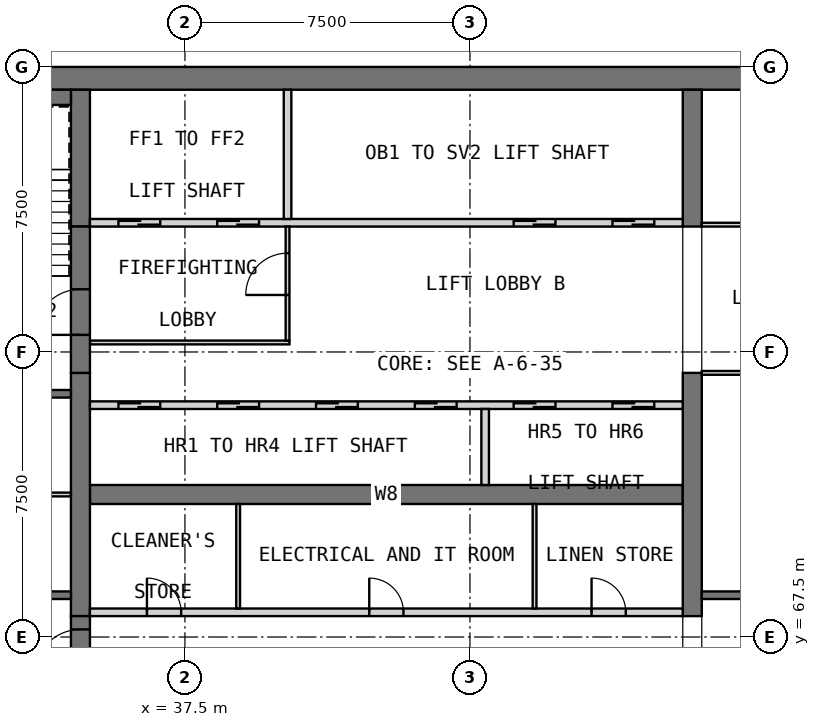
"""IFC4 building model, lengths in metres.
Left out: names, types, materials, properties, quantities, classifications, styles, units other than length and angle.
Written with IfcOpenShell. Run it as: python <this file> out.ifc"""

import sys

from ifc_helpers import new_model, si_unit, direction, frame, frame_2d, origin, place, context, subcontext, project, spatial, rectangle, extrude, element, fill, save


model = new_model("IFC4")
c1 = context("Model", 3, precision=1e-05, world=origin(), true_north=direction((0.0, 1.0)))
c2 = subcontext(c1, "Body", "Model", "MODEL_VIEW")
j1 = project(units=[si_unit("LENGTHUNIT", "METRE"), si_unit("PLANEANGLEUNIT", "RADIAN")], contexts=[c1])
p1 = place(None, origin())
s1 = spatial("IfcSite", under=j1, at=p1, CompositionType="ELEMENT")
p2 = place(p1, origin())
s2 = spatial("IfcBuilding", under=s1, at=p2, CompositionType="ELEMENT")
p3 = place(p2, frame((0.0, 0.0, 280.2)))
s3 = spatial("IfcBuildingStorey", under=s2, at=p3, CompositionType="ELEMENT", Elevation=280.2)
p4 = place(p3, frame((30.0, 82.2, 0.0), z_axis=(0.0, 0.0, 1.0), x_axis=(1.0, 0.0, 0.0)))
e1 = element("IfcWall", 1, at=p4, inside=s3, PredefinedType="SHEAR", context=c2, shape_type="SweptSolid", body=[
    extrude(rectangle(XDim=30.0, YDim=0.6, at=frame_2d((15.0, 0.0))), origin(), (0.0, 0.0, 1.0), 3.5),
])
p5 = place(p3, frame((35.0, 71.25, 0.0), z_axis=(0.0, 0.0, 1.0), x_axis=(1.0, 0.0, 0.0)))
e2 = element("IfcWall", 2, at=p5, inside=s3, PredefinedType="SHEAR", context=c2, shape_type="SweptSolid", body=[
    extrude(rectangle(XDim=15.6, YDim=0.5, at=frame_2d((7.8, 0.0))), origin(), (0.0, 0.0, 1.0), 3.5),
])
p6 = place(p3, frame((34.75, 68.05, 0.0), z_axis=(0.0, 0.0, 1.0), x_axis=(0.0, 1.0, 0.0)))
e3 = element("IfcWall", 3, at=p6, inside=s3, PredefinedType="SHEAR", context=c2, shape_type="SweptSolid", body=[
    extrude(rectangle(XDim=6.4, YDim=0.5, at=frame_2d((3.2, 0.0))), origin(), (0.0, 0.0, 1.0), 3.5),
])
p7 = place(p3, frame((34.75, 78.3, 0.0), z_axis=(0.0, 0.0, 1.0), x_axis=(0.0, 1.0, 0.0)))
e4 = element("IfcWall", 4, at=p7, inside=s3, PredefinedType="SHEAR", context=c2, shape_type="SweptSolid", body=[
    extrude(rectangle(XDim=3.6, YDim=0.5, at=frame_2d((1.8, 0.0))), origin(), (0.0, 0.0, 1.0), 3.5),
])
p8 = place(p3, frame((50.85, 68.05, 0.0), z_axis=(0.0, 0.0, 1.0), x_axis=(0.0, 1.0, 0.0)))
e5 = element("IfcWall", 5, at=p8, inside=s3, PredefinedType="SHEAR", context=c2, shape_type="SweptSolid", body=[
    extrude(rectangle(XDim=6.4, YDim=0.5, at=frame_2d((3.2, 0.0))), origin(), (0.0, 0.0, 1.0), 3.5),
])
p9 = place(p3, frame((50.85, 78.3, 0.0), z_axis=(0.0, 0.0, 1.0), x_axis=(0.0, 1.0, 0.0)))
e6 = element("IfcWall", 6, at=p9, inside=s3, PredefinedType="SHEAR", context=c2, shape_type="SweptSolid", body=[
    extrude(rectangle(XDim=3.6, YDim=0.5, at=frame_2d((1.8, 0.0))), origin(), (0.0, 0.0, 1.0), 3.5),
])
p10 = place(p3, frame((35.0, 68.15, 0.0), z_axis=(0.0, 0.0, 1.0), x_axis=(1.0, 0.0, 0.0)))
e7 = element("IfcWall", 7, at=p10, inside=s3, PredefinedType="PARTITIONING", context=c2, shape_type="SweptSolid", body=[
    extrude(rectangle(XDim=15.6, YDim=0.2, at=frame_2d((7.8, 0.0))), origin(), (0.0, 0.0, 1.0), 3.25),
])
p11 = place(p10, frame((1.5, 0.0, 0.0)))
e8 = element("IfcOpeningElement", 8, at=p11, cuts=e7, PredefinedType="OPENING", context=c2, shape_type="SweptSolid", body=[
    extrude(rectangle(XDim=0.9, YDim=2.1, at=frame_2d((0.45, 1.05))), frame((0.0, 0.11, 0.0), z_axis=(0.0, -1.0, 0.0), x_axis=(1.0, 0.0, 0.0)), (0.0, 0.0, 1.0), 0.22),
])
p12 = place(p10, frame((7.35, 0.0, 0.0)))
e9 = element("IfcOpeningElement", 9, at=p12, cuts=e7, PredefinedType="OPENING", context=c2, shape_type="SweptSolid", body=[
    extrude(rectangle(XDim=0.9, YDim=2.1, at=frame_2d((0.45, 1.05))), frame((0.0, 0.11, 0.0), z_axis=(0.0, -1.0, 0.0), x_axis=(1.0, 0.0, 0.0)), (0.0, 0.0, 1.0), 0.22),
])
p13 = place(p10, frame((13.2, 0.0, 0.0)))
e10 = element("IfcOpeningElement", 10, at=p13, cuts=e7, PredefinedType="OPENING", context=c2, shape_type="SweptSolid", body=[
    extrude(rectangle(XDim=0.9, YDim=2.1, at=frame_2d((0.45, 1.05))), frame((0.0, 0.11, 0.0), z_axis=(0.0, -1.0, 0.0), x_axis=(1.0, 0.0, 0.0)), (0.0, 0.0, 1.0), 0.22),
])
for number, where, z_axis, x_axis in (
    (11, (38.9, 68.25, 0.0), (0.0, 0.0, 1.0), (0.0, 1.0, 0.0)),
    (12, (46.7, 68.25, 0.0), (0.0, 0.0, 1.0), (0.0, 1.0, 0.0)),
):
    element("IfcWall", number, at=place(p3, frame(where, z_axis=z_axis, x_axis=x_axis)), inside=s3, PredefinedType="PARTITIONING", context=c2, shape_type="SweptSolid", body=[
        extrude(rectangle(XDim=2.75, YDim=0.1, at=frame_2d((1.375, 0.0))), origin(), (0.0, 0.0, 1.0), 3.25),
    ])
p14 = place(p3, frame((35.0, 73.6, 0.0), z_axis=(0.0, 0.0, 1.0), x_axis=(1.0, 0.0, 0.0)))
e13 = element("IfcWall", 13, at=p14, inside=s3, PredefinedType="SOLIDWALL", context=c2, shape_type="SweptSolid", body=[
    extrude(rectangle(XDim=15.6, YDim=0.2, at=frame_2d((7.8, 0.0))), origin(), (0.0, 0.0, 1.0), 3.5),
])
p15 = place(p14, frame((0.75, 0.0, 0.0)))
e14 = element("IfcOpeningElement", 14, at=p15, cuts=e13, PredefinedType="OPENING", context=c2, shape_type="SweptSolid", body=[
    extrude(rectangle(XDim=1.1, YDim=2.1, at=frame_2d((0.55, 1.05))), frame((0.0, 0.11, 0.0), z_axis=(0.0, -1.0, 0.0), x_axis=(1.0, 0.0, 0.0)), (0.0, 0.0, 1.0), 0.22),
])
p16 = place(p14, frame((3.35, 0.0, 0.0)))
e15 = element("IfcOpeningElement", 15, at=p16, cuts=e13, PredefinedType="OPENING", context=c2, shape_type="SweptSolid", body=[
    extrude(rectangle(XDim=1.1, YDim=2.1, at=frame_2d((0.55, 1.05))), frame((0.0, 0.11, 0.0), z_axis=(0.0, -1.0, 0.0), x_axis=(1.0, 0.0, 0.0)), (0.0, 0.0, 1.0), 0.22),
])
p17 = place(p14, frame((5.95, 0.0, 0.0)))
e16 = element("IfcOpeningElement", 16, at=p17, cuts=e13, PredefinedType="OPENING", context=c2, shape_type="SweptSolid", body=[
    extrude(rectangle(XDim=1.1, YDim=2.1, at=frame_2d((0.55, 1.05))), frame((0.0, 0.11, 0.0), z_axis=(0.0, -1.0, 0.0), x_axis=(1.0, 0.0, 0.0)), (0.0, 0.0, 1.0), 0.22),
])
p18 = place(p14, frame((8.55, 0.0, 0.0)))
e17 = element("IfcOpeningElement", 17, at=p18, cuts=e13, PredefinedType="OPENING", context=c2, shape_type="SweptSolid", body=[
    extrude(rectangle(XDim=1.1, YDim=2.1, at=frame_2d((0.55, 1.05))), frame((0.0, 0.11, 0.0), z_axis=(0.0, -1.0, 0.0), x_axis=(1.0, 0.0, 0.0)), (0.0, 0.0, 1.0), 0.22),
])
p19 = place(p14, frame((11.15, 0.0, 0.0)))
e18 = element("IfcOpeningElement", 18, at=p19, cuts=e13, PredefinedType="OPENING", context=c2, shape_type="SweptSolid", body=[
    extrude(rectangle(XDim=1.1, YDim=2.1, at=frame_2d((0.55, 1.05))), frame((0.0, 0.11, 0.0), z_axis=(0.0, -1.0, 0.0), x_axis=(1.0, 0.0, 0.0)), (0.0, 0.0, 1.0), 0.22),
])
p20 = place(p14, frame((13.75, 0.0, 0.0)))
e19 = element("IfcOpeningElement", 19, at=p20, cuts=e13, PredefinedType="OPENING", context=c2, shape_type="SweptSolid", body=[
    extrude(rectangle(XDim=1.1, YDim=2.1, at=frame_2d((0.55, 1.05))), frame((0.0, 0.11, 0.0), z_axis=(0.0, -1.0, 0.0), x_axis=(1.0, 0.0, 0.0)), (0.0, 0.0, 1.0), 0.22),
])
p21 = place(p3, frame((45.4, 71.5, 0.0), z_axis=(0.0, 0.0, 1.0), x_axis=(0.0, 1.0, 0.0)))
e20 = element("IfcWall", 20, at=p21, inside=s3, PredefinedType="SOLIDWALL", context=c2, shape_type="SweptSolid", body=[
    extrude(rectangle(XDim=2.0, YDim=0.2, at=frame_2d((1.0, 0.0))), origin(), (0.0, 0.0, 1.0), 3.5),
])
p22 = place(p3, frame((35.0, 78.4, 0.0), z_axis=(0.0, 0.0, 1.0), x_axis=(1.0, 0.0, 0.0)))
e21 = element("IfcWall", 21, at=p22, inside=s3, PredefinedType="SOLIDWALL", context=c2, shape_type="SweptSolid", body=[
    extrude(rectangle(XDim=15.6, YDim=0.2, at=frame_2d((7.8, 0.0))), origin(), (0.0, 0.0, 1.0), 3.5),
])
p23 = place(p22, frame((0.75, 0.0, 0.0)))
e22 = element("IfcOpeningElement", 22, at=p23, cuts=e21, PredefinedType="OPENING", context=c2, shape_type="SweptSolid", body=[
    extrude(rectangle(XDim=1.1, YDim=2.1, at=frame_2d((0.55, 1.05))), frame((0.0, 0.11, 0.0), z_axis=(0.0, -1.0, 0.0), x_axis=(1.0, 0.0, 0.0)), (0.0, 0.0, 1.0), 0.22),
])
p24 = place(p22, frame((3.35, 0.0, 0.0)))
e23 = element("IfcOpeningElement", 23, at=p24, cuts=e21, PredefinedType="OPENING", context=c2, shape_type="SweptSolid", body=[
    extrude(rectangle(XDim=1.1, YDim=2.1, at=frame_2d((0.55, 1.05))), frame((0.0, 0.11, 0.0), z_axis=(0.0, -1.0, 0.0), x_axis=(1.0, 0.0, 0.0)), (0.0, 0.0, 1.0), 0.22),
])
p25 = place(p22, frame((11.15, 0.0, 0.0)))
e24 = element("IfcOpeningElement", 24, at=p25, cuts=e21, PredefinedType="OPENING", context=c2, shape_type="SweptSolid", body=[
    extrude(rectangle(XDim=1.1, YDim=2.1, at=frame_2d((0.55, 1.05))), frame((0.0, 0.11, 0.0), z_axis=(0.0, -1.0, 0.0), x_axis=(1.0, 0.0, 0.0)), (0.0, 0.0, 1.0), 0.22),
])
p26 = place(p22, frame((13.75, 0.0, 0.0)))
e25 = element("IfcOpeningElement", 25, at=p26, cuts=e21, PredefinedType="OPENING", context=c2, shape_type="SweptSolid", body=[
    extrude(rectangle(XDim=1.1, YDim=2.1, at=frame_2d((0.55, 1.05))), frame((0.0, 0.11, 0.0), z_axis=(0.0, -1.0, 0.0), x_axis=(1.0, 0.0, 0.0)), (0.0, 0.0, 1.0), 0.22),
])
p27 = place(p3, frame((40.2, 78.5, 0.0), z_axis=(0.0, 0.0, 1.0), x_axis=(0.0, 1.0, 0.0)))
e26 = element("IfcWall", 26, at=p27, inside=s3, PredefinedType="SOLIDWALL", context=c2, shape_type="SweptSolid", body=[
    extrude(rectangle(XDim=3.4, YDim=0.2, at=frame_2d((1.7, 0.0))), origin(), (0.0, 0.0, 1.0), 3.5),
])
p28 = place(p3, frame((35.0, 75.25, 0.0), z_axis=(0.0, 0.0, 1.0), x_axis=(1.0, 0.0, 0.0)))
e27 = element("IfcWall", 27, at=p28, inside=s3, PredefinedType="PARTITIONING", context=c2, shape_type="SweptSolid", body=[
    extrude(rectangle(XDim=5.25, YDim=0.1, at=frame_2d((2.625, 0.0))), origin(), (0.0, 0.0, 1.0), 3.25),
])
p29 = place(p3, frame((40.2, 75.3, 0.0), z_axis=(0.0, 0.0, 1.0), x_axis=(0.0, 1.0, 0.0)))
e28 = element("IfcWall", 28, at=p29, inside=s3, PredefinedType="PARTITIONING", context=c2, shape_type="SweptSolid", body=[
    extrude(rectangle(XDim=3.0, YDim=0.1, at=frame_2d((1.5, 0.0))), origin(), (0.0, 0.0, 1.0), 3.25),
])
p30 = place(p29, frame((1.2, 0.0, 0.0)))
e29 = element("IfcOpeningElement", 29, at=p30, cuts=e28, PredefinedType="OPENING", context=c2, shape_type="SweptSolid", body=[
    extrude(rectangle(XDim=1.1, YDim=2.1, at=frame_2d((0.55, 1.05))), frame((0.0, 0.06, 0.0), z_axis=(0.0, -1.0, 0.0), x_axis=(1.0, 0.0, 0.0)), (0.0, 0.0, 1.0), 0.12),
])
p31 = place(p3, frame((34.75, 64.2, 0.0), z_axis=(0.0, 0.0, 1.0), x_axis=(0.0, 1.0, 0.0)))
e30 = element("IfcWall", 30, at=p31, inside=s3, PredefinedType="SOLIDWALL", context=c2, shape_type="SweptSolid", body=[
    extrude(rectangle(XDim=3.85, YDim=0.5, at=frame_2d((1.925, 0.0))), origin(), (0.0, 0.0, 1.0), 2.3),
])
p32 = place(p31, frame((2.3, 0.0, 0.0)))
e31 = element("IfcOpeningElement", 31, at=p32, cuts=e30, PredefinedType="OPENING", context=c2, shape_type="SweptSolid", body=[
    extrude(rectangle(XDim=1.2, YDim=2.1, at=frame_2d((0.6, 1.05))), frame((0.0, 0.26, 0.0), z_axis=(0.0, -1.0, 0.0), x_axis=(1.0, 0.0, 0.0)), (0.0, 0.0, 1.0), 0.52),
])
p33 = place(p3, frame((34.75, 74.45, 0.0), z_axis=(0.0, 0.0, 1.0), x_axis=(0.0, 1.0, 0.0)))
e32 = element("IfcWall", 32, at=p33, inside=s3, PredefinedType="SOLIDWALL", context=c2, shape_type="SweptSolid", body=[
    extrude(rectangle(XDim=3.85, YDim=0.5, at=frame_2d((1.925, 0.0))), origin(), (0.0, 0.0, 1.0), 2.3),
])
p34 = place(p33, frame((1.0, 0.0, 0.0)))
e33 = element("IfcOpeningElement", 33, at=p34, cuts=e32, PredefinedType="OPENING", context=c2, shape_type="SweptSolid", body=[
    extrude(rectangle(XDim=1.2, YDim=2.1, at=frame_2d((0.6, 1.05))), frame((0.0, 0.26, 0.0), z_axis=(0.0, -1.0, 0.0), x_axis=(1.0, 0.0, 0.0)), (0.0, 0.0, 1.0), 0.52),
])
p35 = place(p3, frame((30.6, 68.6, 0.0), z_axis=(0.0, 0.0, 1.0), x_axis=(1.0, 0.0, 0.0)))
e34 = element("IfcWall", 34, at=p35, inside=s3, PredefinedType="SOLIDWALL", context=c2, shape_type="SweptSolid", body=[
    extrude(rectangle(XDim=3.9, YDim=0.2, at=frame_2d((1.95, 0.0))), origin(), (0.0, 0.0, 1.0), 3.25),
])
p36 = place(p35, frame((1.7, 0.0, 0.0)))
e35 = element("IfcOpeningElement", 35, at=p36, cuts=e34, PredefinedType="OPENING", context=c2, shape_type="SweptSolid", body=[
    extrude(rectangle(XDim=0.9, YDim=2.1, at=frame_2d((0.45, 1.05))), frame((0.0, 0.11, 0.0), z_axis=(0.0, -1.0, 0.0), x_axis=(1.0, 0.0, 0.0)), (0.0, 0.0, 1.0), 0.22),
])
p37 = place(p3, frame((30.6, 73.9, 0.0), z_axis=(0.0, 0.0, 1.0), x_axis=(1.0, 0.0, 0.0)))
e36 = element("IfcWall", 36, at=p37, inside=s3, PredefinedType="SOLIDWALL", context=c2, shape_type="SweptSolid", body=[
    extrude(rectangle(XDim=3.9, YDim=0.2, at=frame_2d((1.95, 0.0))), origin(), (0.0, 0.0, 1.0), 3.25),
])
p38 = place(p37, frame((1.7, 0.0, 0.0)))
e37 = element("IfcOpeningElement", 37, at=p38, cuts=e36, PredefinedType="OPENING", context=c2, shape_type="SweptSolid", body=[
    extrude(rectangle(XDim=0.9, YDim=2.1, at=frame_2d((0.45, 1.05))), frame((0.0, 0.11, 0.0), z_axis=(0.0, -1.0, 0.0), x_axis=(1.0, 0.0, 0.0)), (0.0, 0.0, 1.0), 0.22),
])
p39 = place(p3, frame((51.1, 68.6, 0.0), z_axis=(0.0, 0.0, 1.0), x_axis=(1.0, 0.0, 0.0)))
e38 = element("IfcWall", 38, at=p39, inside=s3, PredefinedType="SOLIDWALL", context=c2, shape_type="SweptSolid", body=[
    extrude(rectangle(XDim=8.3, YDim=0.2, at=frame_2d((4.15, 0.0))), origin(), (0.0, 0.0, 1.0), 3.25),
])
p40 = place(p3, frame((31.0, 81.7, 0.0), z_axis=(0.0, 0.0, 1.0), x_axis=(1.0, 0.0, 0.0)))
e39 = element("IfcWall", 39, at=p40, inside=s3, PredefinedType="SOLIDWALL", context=c2, shape_type="SweptSolid", body=[
    extrude(rectangle(XDim=3.5, YDim=0.4, at=frame_2d((1.75, 0.0))), origin(), (0.0, 0.0, 1.0), 3.25),
])
p41 = place(p3, frame((30.6, 71.25, 0.0), z_axis=(0.0, 0.0, 1.0), x_axis=(1.0, 0.0, 0.0)))
e40 = element("IfcWall", 40, at=p41, inside=s3, PredefinedType="PARTITIONING", context=c2, shape_type="SweptSolid", body=[
    extrude(rectangle(XDim=3.9, YDim=0.1, at=frame_2d((1.95, 0.0))), origin(), (0.0, 0.0, 1.0), 3.25),
])
p42 = place(p3, frame((51.1, 74.45, 0.0), z_axis=(0.0, 0.0, 1.0), x_axis=(1.0, 0.0, 0.0)))
e41 = element("IfcWall", 41, at=p42, inside=s3, PredefinedType="PARTITIONING", context=c2, shape_type="SweptSolid", body=[
    extrude(rectangle(XDim=8.3, YDim=0.1, at=frame_2d((4.15, 0.0))), origin(), (0.0, 0.0, 1.0), 3.25),
])
p43 = place(p42, frame((3.7, 0.0, 0.0)))
e42 = element("IfcOpeningElement", 42, at=p43, cuts=e41, PredefinedType="OPENING", context=c2, shape_type="SweptSolid", body=[
    extrude(rectangle(XDim=0.9, YDim=2.1, at=frame_2d((0.45, 1.05))), frame((0.0, 0.06, 0.0), z_axis=(0.0, -1.0, 0.0), x_axis=(1.0, 0.0, 0.0)), (0.0, 0.0, 1.0), 0.12),
])
p44 = place(p3, frame((51.1, 78.35, 0.0), z_axis=(0.0, 0.0, 1.0), x_axis=(1.0, 0.0, 0.0)))
e43 = element("IfcWall", 43, at=p44, inside=s3, PredefinedType="PARTITIONING", context=c2, shape_type="SweptSolid", body=[
    extrude(rectangle(XDim=8.3, YDim=0.1, at=frame_2d((4.15, 0.0))), origin(), (0.0, 0.0, 1.0), 3.25),
])
p45 = place(p44, frame((3.7, 0.0, 0.0)))
e44 = element("IfcOpeningElement", 44, at=p45, cuts=e43, PredefinedType="OPENING", context=c2, shape_type="SweptSolid", body=[
    extrude(rectangle(XDim=0.9, YDim=2.1, at=frame_2d((0.45, 1.05))), frame((0.0, 0.06, 0.0), z_axis=(0.0, -1.0, 0.0), x_axis=(1.0, 0.0, 0.0)), (0.0, 0.0, 1.0), 0.12),
])
p46 = place(p11, origin())
e45 = element("IfcDoor", 45, at=p46, inside=s3, OperationType="SINGLE_SWING_RIGHT", PredefinedType="DOOR", context=c2, shape_type="SweptSolid", body=[
    extrude(rectangle(XDim=0.9, YDim=2.1, at=frame_2d((0.45, 1.05))), frame((0.0, 0.025, 0.0), z_axis=(0.0, -1.0, 0.0), x_axis=(1.0, 0.0, 0.0)), (0.0, 0.0, 1.0), 0.05),
])
fill(e8, e45)
p47 = place(p12, origin())
e46 = element("IfcDoor", 46, at=p47, inside=s3, OperationType="SINGLE_SWING_LEFT", PredefinedType="DOOR", context=c2, shape_type="SweptSolid", body=[
    extrude(rectangle(XDim=0.9, YDim=2.1, at=frame_2d((0.45, 1.05))), frame((0.0, 0.025, 0.0), z_axis=(0.0, -1.0, 0.0), x_axis=(1.0, 0.0, 0.0)), (0.0, 0.0, 1.0), 0.05),
])
fill(e9, e46)
p48 = place(p13, origin())
e47 = element("IfcDoor", 47, at=p48, inside=s3, OperationType="SINGLE_SWING_RIGHT", PredefinedType="DOOR", context=c2, shape_type="SweptSolid", body=[
    extrude(rectangle(XDim=0.9, YDim=2.1, at=frame_2d((0.45, 1.05))), frame((0.0, 0.025, 0.0), z_axis=(0.0, -1.0, 0.0), x_axis=(1.0, 0.0, 0.0)), (0.0, 0.0, 1.0), 0.05),
])
fill(e10, e47)
p49 = place(p15, origin())
e48 = element("IfcDoor", 48, at=p49, inside=s3, OperationType="DOUBLE_DOOR_SLIDING", PredefinedType="DOOR", context=c2, shape_type="SweptSolid", body=[
    extrude(rectangle(XDim=1.1, YDim=2.1, at=frame_2d((0.55, 1.05))), frame((0.0, 0.025, 0.0), z_axis=(0.0, -1.0, 0.0), x_axis=(1.0, 0.0, 0.0)), (0.0, 0.0, 1.0), 0.05),
])
fill(e14, e48)
p50 = place(p16, origin())
e49 = element("IfcDoor", 49, at=p50, inside=s3, OperationType="DOUBLE_DOOR_SLIDING", PredefinedType="DOOR", context=c2, shape_type="SweptSolid", body=[
    extrude(rectangle(XDim=1.1, YDim=2.1, at=frame_2d((0.55, 1.05))), frame((0.0, 0.025, 0.0), z_axis=(0.0, -1.0, 0.0), x_axis=(1.0, 0.0, 0.0)), (0.0, 0.0, 1.0), 0.05),
])
fill(e15, e49)
p51 = place(p17, origin())
e50 = element("IfcDoor", 50, at=p51, inside=s3, OperationType="DOUBLE_DOOR_SLIDING", PredefinedType="DOOR", context=c2, shape_type="SweptSolid", body=[
    extrude(rectangle(XDim=1.1, YDim=2.1, at=frame_2d((0.55, 1.05))), frame((0.0, 0.025, 0.0), z_axis=(0.0, -1.0, 0.0), x_axis=(1.0, 0.0, 0.0)), (0.0, 0.0, 1.0), 0.05),
])
fill(e16, e50)
p52 = place(p18, origin())
e51 = element("IfcDoor", 51, at=p52, inside=s3, OperationType="DOUBLE_DOOR_SLIDING", PredefinedType="DOOR", context=c2, shape_type="SweptSolid", body=[
    extrude(rectangle(XDim=1.1, YDim=2.1, at=frame_2d((0.55, 1.05))), frame((0.0, 0.025, 0.0), z_axis=(0.0, -1.0, 0.0), x_axis=(1.0, 0.0, 0.0)), (0.0, 0.0, 1.0), 0.05),
])
fill(e17, e51)
p53 = place(p19, origin())
e52 = element("IfcDoor", 52, at=p53, inside=s3, OperationType="DOUBLE_DOOR_SLIDING", PredefinedType="DOOR", context=c2, shape_type="SweptSolid", body=[
    extrude(rectangle(XDim=1.1, YDim=2.1, at=frame_2d((0.55, 1.05))), frame((0.0, 0.025, 0.0), z_axis=(0.0, -1.0, 0.0), x_axis=(1.0, 0.0, 0.0)), (0.0, 0.0, 1.0), 0.05),
])
fill(e18, e52)
p54 = place(p20, origin())
e53 = element("IfcDoor", 53, at=p54, inside=s3, OperationType="DOUBLE_DOOR_SLIDING", PredefinedType="DOOR", context=c2, shape_type="SweptSolid", body=[
    extrude(rectangle(XDim=1.1, YDim=2.1, at=frame_2d((0.55, 1.05))), frame((0.0, 0.025, 0.0), z_axis=(0.0, -1.0, 0.0), x_axis=(1.0, 0.0, 0.0)), (0.0, 0.0, 1.0), 0.05),
])
fill(e19, e53)
p55 = place(p23, origin())
e54 = element("IfcDoor", 54, at=p55, inside=s3, OperationType="DOUBLE_DOOR_SLIDING", PredefinedType="DOOR", context=c2, shape_type="SweptSolid", body=[
    extrude(rectangle(XDim=1.1, YDim=2.1, at=frame_2d((0.55, 1.05))), frame((0.0, 0.025, 0.0), z_axis=(0.0, -1.0, 0.0), x_axis=(1.0, 0.0, 0.0)), (0.0, 0.0, 1.0), 0.05),
])
fill(e22, e54)
p56 = place(p24, origin())
e55 = element("IfcDoor", 55, at=p56, inside=s3, OperationType="DOUBLE_DOOR_SLIDING", PredefinedType="DOOR", context=c2, shape_type="SweptSolid", body=[
    extrude(rectangle(XDim=1.1, YDim=2.1, at=frame_2d((0.55, 1.05))), frame((0.0, 0.025, 0.0), z_axis=(0.0, -1.0, 0.0), x_axis=(1.0, 0.0, 0.0)), (0.0, 0.0, 1.0), 0.05),
])
fill(e23, e55)
p57 = place(p25, origin())
e56 = element("IfcDoor", 56, at=p57, inside=s3, OperationType="DOUBLE_DOOR_SLIDING", PredefinedType="DOOR", context=c2, shape_type="SweptSolid", body=[
    extrude(rectangle(XDim=1.1, YDim=2.1, at=frame_2d((0.55, 1.05))), frame((0.0, 0.025, 0.0), z_axis=(0.0, -1.0, 0.0), x_axis=(1.0, 0.0, 0.0)), (0.0, 0.0, 1.0), 0.05),
])
fill(e24, e56)
p58 = place(p26, origin())
e57 = element("IfcDoor", 57, at=p58, inside=s3, OperationType="DOUBLE_DOOR_SLIDING", PredefinedType="DOOR", context=c2, shape_type="SweptSolid", body=[
    extrude(rectangle(XDim=1.1, YDim=2.1, at=frame_2d((0.55, 1.05))), frame((0.0, 0.025, 0.0), z_axis=(0.0, -1.0, 0.0), x_axis=(1.0, 0.0, 0.0)), (0.0, 0.0, 1.0), 0.05),
])
fill(e25, e57)
p59 = place(p30, origin())
e58 = element("IfcDoor", 58, at=p59, inside=s3, OperationType="SINGLE_SWING_LEFT", PredefinedType="DOOR", context=c2, shape_type="SweptSolid", body=[
    extrude(rectangle(XDim=1.1, YDim=2.1, at=frame_2d((0.55, 1.05))), frame((0.0, 0.025, 0.0), z_axis=(0.0, -1.0, 0.0), x_axis=(1.0, 0.0, 0.0)), (0.0, 0.0, 1.0), 0.05),
])
fill(e29, e58)
p60 = place(p32, origin())
e59 = element("IfcDoor", 59, at=p60, inside=s3, OperationType="SINGLE_SWING_LEFT", PredefinedType="DOOR", context=c2, shape_type="SweptSolid", body=[
    extrude(rectangle(XDim=1.2, YDim=2.1, at=frame_2d((0.6, 1.05))), frame((0.0, 0.025, 0.0), z_axis=(0.0, -1.0, 0.0), x_axis=(1.0, 0.0, 0.0)), (0.0, 0.0, 1.0), 0.05),
])
fill(e31, e59)
p61 = place(p34, origin())
e60 = element("IfcDoor", 60, at=p61, inside=s3, OperationType="SINGLE_SWING_RIGHT", PredefinedType="DOOR", context=c2, shape_type="SweptSolid", body=[
    extrude(rectangle(XDim=1.2, YDim=2.1, at=frame_2d((0.6, 1.05))), frame((0.0, 0.025, 0.0), z_axis=(0.0, -1.0, 0.0), x_axis=(1.0, 0.0, 0.0)), (0.0, 0.0, 1.0), 0.05),
])
fill(e33, e60)
save(model, sys.argv[1])
